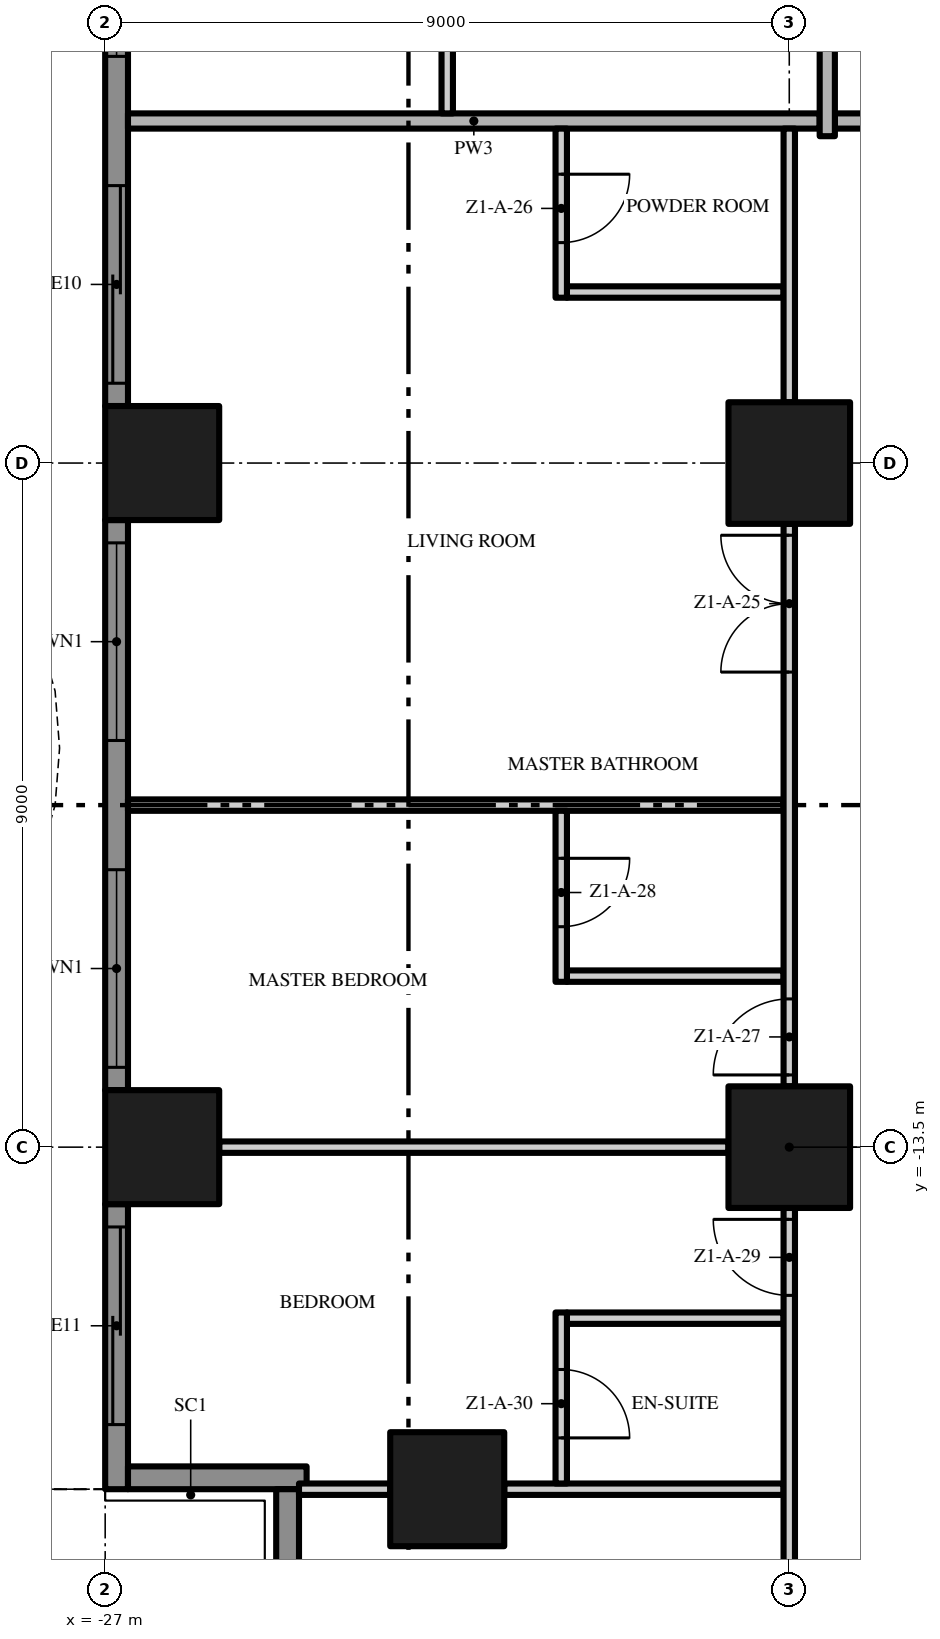
"""IFC4 building model, lengths in metres.
Left out: names, types, materials, properties, quantities, classifications, styles, units other than length and angle.
Written with IfcOpenShell. Run it as: python <this file> out.ifc"""

import sys

from ifc_helpers import new_model, si_unit, direction, frame, frame_2d, origin, origin_2d, place, context, subcontext, project, spatial, polyline, rectangle, outline, extrude, element, fill, save


model = new_model("IFC4")
c1 = context("Model", 3, precision=1e-05, world=origin(), true_north=direction((0.0, 1.0)))
c2 = subcontext(c1, "Body", "Model", "MODEL_VIEW")
j1 = project(units=[si_unit("LENGTHUNIT", "METRE"), si_unit("PLANEANGLEUNIT", "RADIAN")], contexts=[c1])
p1 = place(None, origin())
s1 = spatial("IfcSite", under=j1, at=p1, CompositionType="ELEMENT")
p2 = place(p1, origin())
s2 = spatial("IfcBuilding", under=s1, at=p2, CompositionType="ELEMENT")
p3 = place(p2, frame((0.0, 0.0, 15.0)))
s3 = spatial("IfcBuildingStorey", under=s2, at=p3, CompositionType="ELEMENT", Elevation=15.0)
for number, where, z_axis, x_axis in (
    (1, (-18.0, -13.5, 0.0), (0.0, 0.0, 1.0), (1.0, 0.0, 0.0)),
    (2, (-18.0, -4.5, 0.0), (0.0, 0.0, 1.0), (1.0, 0.0, 0.0)),
):
    element("IfcColumn", number, at=place(p3, frame(where, z_axis=z_axis, x_axis=x_axis)), inside=s3, PredefinedType="COLUMN", context=c2, shape_type="SweptSolid", body=[
        extrude(rectangle(XDim=1.6, YDim=1.6, at=origin_2d()), origin(), (0.0, 0.0, 1.0), 3.5),
    ])
for number, where, z_axis, x_axis in (
    (3, (-26.25, -13.5, 0.0), (0.0, 0.0, 1.0), (1.0, 0.0, 0.0)),
    (4, (-22.5, -18.0, 0.0), (0.0, 0.0, 1.0), (1.0, 0.0, 0.0)),
    (5, (-26.25, -4.5, 0.0), (0.0, 0.0, 1.0), (1.0, 0.0, 0.0)),
):
    element("IfcColumn", number, at=place(p3, frame(where, z_axis=z_axis, x_axis=x_axis)), inside=s3, PredefinedType="COLUMN", context=c2, shape_type="SweptSolid", body=[
        extrude(rectangle(XDim=1.5, YDim=1.5, at=origin_2d()), origin(), (0.0, 0.0, 1.0), 3.5),
    ])
p4 = place(p3, frame((-26.85, -3.75, 0.0), z_axis=(0.0, 0.0, 1.0), x_axis=(0.0, 1.0, 0.0)))
e6 = element("IfcWall", 6, at=p4, inside=s3, PredefinedType="SOLIDWALL", context=c2, shape_type="SweptSolid", body=[
    extrude(rectangle(XDim=7.5, YDim=0.3, at=frame_2d((3.75, 0.0))), origin(), (0.0, 0.0, 1.0), 3.5),
])
p5 = place(p4, frame((4.6, 0.0, 0.45)))
e7 = element("IfcOpeningElement", 7, at=p5, cuts=e6, PredefinedType="OPENING", context=c2, shape_type="SweptSolid", body=[
    extrude(rectangle(XDim=2.6, YDim=2.65, at=frame_2d((1.3, 1.325))), frame((0.0, 0.16, 0.0), z_axis=(0.0, -1.0, 0.0), x_axis=(1.0, 0.0, 0.0)), (0.0, 0.0, 1.0), 0.32),
])
p6 = place(p4, frame((0.3, 0.0, 0.0)))
e8 = element("IfcOpeningElement", 8, at=p6, cuts=e6, PredefinedType="OPENING", context=c2, shape_type="SweptSolid", body=[
    extrude(rectangle(XDim=2.6, YDim=2.4, at=frame_2d((1.3, 1.2))), frame((0.0, 0.16, 0.0), z_axis=(0.0, -1.0, 0.0), x_axis=(1.0, 0.0, 0.0)), (0.0, 0.0, 1.0), 0.32),
])
p7 = place(p3, frame((-26.85, -12.75, 0.0), z_axis=(0.0, 0.0, 1.0), x_axis=(0.0, 1.0, 0.0)))
e9 = element("IfcWall", 9, at=p7, inside=s3, PredefinedType="SOLIDWALL", context=c2, shape_type="SweptSolid", body=[
    extrude(rectangle(XDim=7.5, YDim=0.3, at=frame_2d((3.75, 0.0))), origin(), (0.0, 0.0, 1.0), 3.5),
])
p8 = place(p7, frame((4.6, 0.0, 0.45)))
e10 = element("IfcOpeningElement", 10, at=p8, cuts=e9, PredefinedType="OPENING", context=c2, shape_type="SweptSolid", body=[
    extrude(rectangle(XDim=2.6, YDim=2.65, at=frame_2d((1.3, 1.325))), frame((0.0, 0.16, 0.0), z_axis=(0.0, -1.0, 0.0), x_axis=(1.0, 0.0, 0.0)), (0.0, 0.0, 1.0), 0.32),
])
p9 = place(p7, frame((0.3, 0.0, 0.45)))
e11 = element("IfcOpeningElement", 11, at=p9, cuts=e9, PredefinedType="OPENING", context=c2, shape_type="SweptSolid", body=[
    extrude(rectangle(XDim=2.6, YDim=2.65, at=frame_2d((1.3, 1.325))), frame((0.0, 0.16, 0.0), z_axis=(0.0, -1.0, 0.0), x_axis=(1.0, 0.0, 0.0)), (0.0, 0.0, 1.0), 0.32),
])
p10 = place(p3, frame((-26.85, -18.0, 0.0), z_axis=(0.0, 0.0, 1.0), x_axis=(0.0, 1.0, 0.0)))
e12 = element("IfcWall", 12, at=p10, inside=s3, PredefinedType="SOLIDWALL", context=c2, shape_type="SweptSolid", body=[
    extrude(rectangle(XDim=3.75, YDim=0.3, at=frame_2d((1.875, 0.0))), origin(), (0.0, 0.0, 1.0), 3.5),
])
p11 = place(p10, frame((0.85, 0.0, 0.0)))
e13 = element("IfcOpeningElement", 13, at=p11, cuts=e12, PredefinedType="OPENING", context=c2, shape_type="SweptSolid", body=[
    extrude(rectangle(XDim=2.6, YDim=2.4, at=frame_2d((1.3, 1.2))), frame((0.0, 0.16, 0.0), z_axis=(0.0, -1.0, 0.0), x_axis=(1.0, 0.0, 0.0)), (0.0, 0.0, 1.0), 0.32),
])
p12 = place(p3, frame((-24.35, -17.85, 0.0), z_axis=(0.0, 0.0, 1.0), x_axis=(-1.0, 0.0, 0.0)))
e14 = element("IfcWall", 14, at=p12, inside=s3, PredefinedType="SOLIDWALL", context=c2, shape_type="SweptSolid", body=[
    extrude(rectangle(XDim=2.35, YDim=0.3, at=frame_2d((1.175, 0.0))), origin(), (0.0, 0.0, 1.0), 3.5),
])
p13 = place(p3, frame((-24.6, -20.25, 0.0), z_axis=(0.0, 0.0, 1.0), x_axis=(0.0, 1.0, 0.0)))
e15 = element("IfcWall", 15, at=p13, inside=s3, PredefinedType="SOLIDWALL", context=c2, shape_type="SweptSolid", body=[
    extrude(rectangle(XDim=2.25, YDim=0.3, at=frame_2d((1.125, 0.0))), origin(), (0.0, 0.0, 1.0), 3.5),
])
p14 = place(p3, origin())
e16 = element("IfcWall", 16, at=p14, inside=s3, PredefinedType="USERDEFINED", context=c2, shape_type="SweptSolid", body=[
    extrude(outline(polyline([(-28.8, 18.0), (-29.505, 16.5), (-29.941, 15.0), (-30.0, 14.25), (-29.941, 13.5), (-29.505, 12.0), (-28.8, 10.5), (-28.095, 9.0), (-27.659, 7.5), (-27.6, 6.75), (-27.659, 6.0), (-28.095, 4.5), (-28.8, 3.0), (-29.505, 1.5), (-29.941, 0.0), (-30.0, -0.75), (-29.941, -1.5), (-29.505, -3.0), (-28.8, -4.5), (-28.095, -6.0), (-27.659, -7.5), (-27.6, -8.25), (-27.659, -9.0), (-28.095, -10.5), (-28.8, -12.0), (-29.505, -13.5), (-29.941, -15.0), (-30.0, -15.75), (-29.941, -16.5), (-29.505, -18.0), (-29.265, -17.93), (-29.694, -16.455), (-29.749, -15.75), (-29.694, -15.045), (-29.271, -13.589), (-28.574, -12.106), (-27.86, -10.589), (-27.411, -9.045), (-27.349, -8.25), (-27.411, -7.455), (-27.86, -5.911), (-28.574, -4.394), (-29.271, -2.911), (-29.694, -1.455), (-29.749, -0.75), (-29.694, -0.045), (-29.271, 1.411), (-28.574, 2.894), (-27.86, 4.411), (-27.411, 5.955), (-27.349, 6.75), (-27.411, 7.545), (-27.86, 9.089), (-28.574, 10.606), (-29.271, 12.089), (-29.694, 13.545), (-29.749, 14.25), (-29.694, 14.955), (-29.271, 16.411), (-28.574, 17.894), (-28.8, 18.0)])), origin(), (0.0, 0.0, 1.0), 0.9),
])
p15 = place(p3, frame((-24.45, -18.0, 0.0), z_axis=(0.0, 0.0, 1.0), x_axis=(1.0, 0.0, 0.0)))
e17 = element("IfcWall", 17, at=p15, inside=s3, PredefinedType="PARTITIONING", context=c2, shape_type="SweptSolid", body=[
    extrude(rectangle(XDim=1.2, YDim=0.15, at=frame_2d((0.6, 0.0))), origin(), (0.0, 0.0, 1.0), 3.5),
])
p16 = place(p3, frame((-21.75, -18.0, 0.0), z_axis=(0.0, 0.0, 1.0), x_axis=(1.0, 0.0, 0.0)))
e18 = element("IfcWall", 18, at=p16, inside=s3, PredefinedType="PARTITIONING", context=c2, shape_type="SweptSolid", body=[
    extrude(rectangle(XDim=3.675, YDim=0.15, at=frame_2d((1.837, 0.0))), origin(), (0.0, 0.0, 1.0), 3.5),
])
p17 = place(p3, frame((-20.925, -15.75, 0.0), z_axis=(0.0, 0.0, 1.0), x_axis=(1.0, 0.0, 0.0)))
e19 = element("IfcWall", 19, at=p17, inside=s3, PredefinedType="PARTITIONING", context=c2, shape_type="SweptSolid", body=[
    extrude(rectangle(XDim=2.85, YDim=0.15, at=frame_2d((1.425, 0.0))), origin(), (0.0, 0.0, 1.0), 3.5),
])
p18 = place(p3, frame((-25.5, -13.5, 0.0), z_axis=(0.0, 0.0, 1.0), x_axis=(1.0, 0.0, 0.0)))
e20 = element("IfcWall", 20, at=p18, inside=s3, PredefinedType="PARTITIONING", context=c2, shape_type="SweptSolid", body=[
    extrude(rectangle(XDim=6.7, YDim=0.15, at=frame_2d((3.35, 0.0))), origin(), (0.0, 0.0, 1.0), 3.5),
])
p19 = place(p3, frame((-20.925, -11.25, 0.0), z_axis=(0.0, 0.0, 1.0), x_axis=(1.0, 0.0, 0.0)))
e21 = element("IfcWall", 21, at=p19, inside=s3, PredefinedType="PARTITIONING", context=c2, shape_type="SweptSolid", body=[
    extrude(rectangle(XDim=2.85, YDim=0.15, at=frame_2d((1.425, 0.0))), origin(), (0.0, 0.0, 1.0), 3.5),
])
p20 = place(p3, frame((-26.7, -9.0, 0.0), z_axis=(0.0, 0.0, 1.0), x_axis=(1.0, 0.0, 0.0)))
e22 = element("IfcWall", 22, at=p20, inside=s3, PredefinedType="PARTITIONING", context=c2, shape_type="SweptSolid", body=[
    extrude(rectangle(XDim=8.625, YDim=0.15, at=frame_2d((4.312, 0.0))), origin(), (0.0, 0.0, 1.0), 3.5),
])
p21 = place(p3, frame((-20.925, -2.25, 0.0), z_axis=(0.0, 0.0, 1.0), x_axis=(1.0, 0.0, 0.0)))
e23 = element("IfcWall", 23, at=p21, inside=s3, PredefinedType="PARTITIONING", context=c2, shape_type="SweptSolid", body=[
    extrude(rectangle(XDim=2.85, YDim=0.15, at=frame_2d((1.425, 0.0))), origin(), (0.0, 0.0, 1.0), 3.5),
])
p22 = place(p3, frame((-17.4, 0.0, 0.0), z_axis=(0.0, 0.0, 1.0), x_axis=(1.0, 0.0, 0.0)))
e24 = element("IfcWall", 24, at=p22, inside=s3, PredefinedType="PARTITIONING", context=c2, shape_type="SweptSolid", body=[
    extrude(rectangle(XDim=12.8, YDim=0.2, at=frame_2d((6.4, 0.0))), origin(), (0.0, 0.0, 1.0), 3.5),
])
p23 = place(p3, frame((-26.7, 0.0, 0.0), z_axis=(0.0, 0.0, 1.0), x_axis=(1.0, 0.0, 0.0)))
e25 = element("IfcWall", 25, at=p23, inside=s3, PredefinedType="PARTITIONING", context=c2, shape_type="SweptSolid", body=[
    extrude(rectangle(XDim=9.1, YDim=0.2, at=frame_2d((4.55, 0.0))), origin(), (0.0, 0.0, 1.0), 3.5),
])
p24 = place(p3, frame((-22.5, 0.1, 0.0), z_axis=(0.0, 0.0, 1.0), x_axis=(0.0, 1.0, 0.0)))
e26 = element("IfcWall", 26, at=p24, inside=s3, PredefinedType="PARTITIONING", context=c2, shape_type="SweptSolid", body=[
    extrude(rectangle(XDim=17.15, YDim=0.15, at=frame_2d((8.575, 0.0))), origin(), (0.0, 0.0, 1.0), 3.5),
])
p25 = place(p24, frame((1.65, 0.0, 0.0)))
e27 = element("IfcOpeningElement", 27, at=p25, cuts=e26, PredefinedType="OPENING", context=c2, shape_type="SweptSolid", body=[
    extrude(rectangle(XDim=1.0, YDim=2.4, at=frame_2d((0.5, 1.2))), frame((0.0, 0.085, 0.0), z_axis=(0.0, -1.0, 0.0), x_axis=(1.0, 0.0, 0.0)), (0.0, 0.0, 1.0), 0.17),
])
p26 = place(p24, frame((7.25, 0.0, 0.0)))
e28 = element("IfcOpeningElement", 28, at=p26, cuts=e26, PredefinedType="OPENING", context=c2, shape_type="SweptSolid", body=[
    extrude(rectangle(XDim=1.0, YDim=2.4, at=frame_2d((0.5, 1.2))), frame((0.0, 0.085, 0.0), z_axis=(0.0, -1.0, 0.0), x_axis=(1.0, 0.0, 0.0)), (0.0, 0.0, 1.0), 0.17),
])
p27 = place(p24, frame((9.5, 0.0, 0.0)))
e29 = element("IfcOpeningElement", 29, at=p27, cuts=e26, PredefinedType="OPENING", context=c2, shape_type="SweptSolid", body=[
    extrude(rectangle(XDim=1.0, YDim=2.4, at=frame_2d((0.5, 1.2))), frame((0.0, 0.085, 0.0), z_axis=(0.0, -1.0, 0.0), x_axis=(1.0, 0.0, 0.0)), (0.0, 0.0, 1.0), 0.17),
])
p28 = place(p24, frame((16.0, 0.0, 0.0)))
e30 = element("IfcOpeningElement", 30, at=p28, cuts=e26, PredefinedType="OPENING", context=c2, shape_type="SweptSolid", body=[
    extrude(rectangle(XDim=1.0, YDim=2.4, at=frame_2d((0.5, 1.2))), frame((0.0, 0.085, 0.0), z_axis=(0.0, -1.0, 0.0), x_axis=(1.0, 0.0, 0.0)), (0.0, 0.0, 1.0), 0.17),
])
p29 = place(p3, frame((-21.0, -15.675, 0.0), z_axis=(0.0, 0.0, 1.0), x_axis=(0.0, -1.0, 0.0)))
e31 = element("IfcWall", 31, at=p29, inside=s3, PredefinedType="PARTITIONING", context=c2, shape_type="SweptSolid", body=[
    extrude(rectangle(XDim=2.25, YDim=0.15, at=frame_2d((1.125, 0.0))), origin(), (0.0, 0.0, 1.0), 3.5),
])
p30 = place(p29, frame((0.75, 0.0, 0.0)))
e32 = element("IfcOpeningElement", 32, at=p30, cuts=e31, PredefinedType="OPENING", context=c2, shape_type="SweptSolid", body=[
    extrude(rectangle(XDim=0.9, YDim=2.1, at=frame_2d((0.45, 1.05))), frame((0.0, 0.085, 0.0), z_axis=(0.0, -1.0, 0.0), x_axis=(1.0, 0.0, 0.0)), (0.0, 0.0, 1.0), 0.17),
])
p31 = place(p3, frame((-21.0, -9.075, 0.0), z_axis=(0.0, 0.0, 1.0), x_axis=(0.0, -1.0, 0.0)))
e33 = element("IfcWall", 33, at=p31, inside=s3, PredefinedType="PARTITIONING", context=c2, shape_type="SweptSolid", body=[
    extrude(rectangle(XDim=2.25, YDim=0.15, at=frame_2d((1.125, 0.0))), origin(), (0.0, 0.0, 1.0), 3.5),
])
p32 = place(p31, frame((0.625, 0.0, 0.0)))
e34 = element("IfcOpeningElement", 34, at=p32, cuts=e33, PredefinedType="OPENING", context=c2, shape_type="SweptSolid", body=[
    extrude(rectangle(XDim=0.9, YDim=2.1, at=frame_2d((0.45, 1.05))), frame((0.0, 0.085, 0.0), z_axis=(0.0, -1.0, 0.0), x_axis=(1.0, 0.0, 0.0)), (0.0, 0.0, 1.0), 0.17),
])
p33 = place(p3, frame((-21.0, -0.1, 0.0), z_axis=(0.0, 0.0, 1.0), x_axis=(0.0, -1.0, 0.0)))
e35 = element("IfcWall", 35, at=p33, inside=s3, PredefinedType="PARTITIONING", context=c2, shape_type="SweptSolid", body=[
    extrude(rectangle(XDim=2.225, YDim=0.15, at=frame_2d((1.113, 0.0))), origin(), (0.0, 0.0, 1.0), 3.5),
])
p34 = place(p33, frame((0.6, 0.0, 0.0)))
e36 = element("IfcOpeningElement", 36, at=p34, cuts=e35, PredefinedType="OPENING", context=c2, shape_type="SweptSolid", body=[
    extrude(rectangle(XDim=0.9, YDim=2.1, at=frame_2d((0.45, 1.05))), frame((0.0, 0.085, 0.0), z_axis=(0.0, -1.0, 0.0), x_axis=(1.0, 0.0, 0.0)), (0.0, 0.0, 1.0), 0.17),
])
p35 = place(p3, frame((-18.0, -21.0, 0.0), z_axis=(0.0, 0.0, 1.0), x_axis=(0.0, 1.0, 0.0)))
e37 = element("IfcWall", 37, at=p35, inside=s3, PredefinedType="PARTITIONING", context=c2, shape_type="SweptSolid", body=[
    extrude(rectangle(XDim=6.7, YDim=0.15, at=frame_2d((3.35, 0.0))), origin(), (0.0, 0.0, 1.0), 3.5),
])
p36 = place(p35, frame((5.55, 0.0, 0.0)))
e38 = element("IfcOpeningElement", 38, at=p36, cuts=e37, PredefinedType="OPENING", context=c2, shape_type="SweptSolid", body=[
    extrude(rectangle(XDim=1.0, YDim=2.4, at=frame_2d((0.5, 1.2))), frame((0.0, 0.085, 0.0), z_axis=(0.0, -1.0, 0.0), x_axis=(1.0, 0.0, 0.0)), (0.0, 0.0, 1.0), 0.17),
])
p37 = place(p35, frame((0.25, 0.0, 0.0)))
e39 = element("IfcOpeningElement", 39, at=p37, cuts=e37, PredefinedType="OPENING", context=c2, shape_type="SweptSolid", body=[
    extrude(rectangle(XDim=1.0, YDim=2.4, at=frame_2d((0.5, 1.2))), frame((0.0, 0.085, 0.0), z_axis=(0.0, -1.0, 0.0), x_axis=(1.0, 0.0, 0.0)), (0.0, 0.0, 1.0), 0.17),
])
p38 = place(p3, frame((-18.0, -12.7, 0.0), z_axis=(0.0, 0.0, 1.0), x_axis=(0.0, 1.0, 0.0)))
e40 = element("IfcWall", 40, at=p38, inside=s3, PredefinedType="PARTITIONING", context=c2, shape_type="SweptSolid", body=[
    extrude(rectangle(XDim=7.4, YDim=0.15, at=frame_2d((3.7, 0.0))), origin(), (0.0, 0.0, 1.0), 3.5),
])
p39 = place(p38, frame((5.45, 0.0, 0.0)))
e41 = element("IfcOpeningElement", 41, at=p39, cuts=e40, PredefinedType="OPENING", context=c2, shape_type="SweptSolid", body=[
    extrude(rectangle(XDim=1.8, YDim=2.4, at=frame_2d((0.9, 1.2))), frame((0.0, 0.085, 0.0), z_axis=(0.0, -1.0, 0.0), x_axis=(1.0, 0.0, 0.0)), (0.0, 0.0, 1.0), 0.17),
])
p40 = place(p38, frame((0.15, 0.0, 0.0)))
e42 = element("IfcOpeningElement", 42, at=p40, cuts=e40, PredefinedType="OPENING", context=c2, shape_type="SweptSolid", body=[
    extrude(rectangle(XDim=1.0, YDim=2.4, at=frame_2d((0.5, 1.2))), frame((0.0, 0.085, 0.0), z_axis=(0.0, -1.0, 0.0), x_axis=(1.0, 0.0, 0.0)), (0.0, 0.0, 1.0), 0.17),
])
p41 = place(p3, frame((-18.0, -3.7, 0.0), z_axis=(0.0, 0.0, 1.0), x_axis=(0.0, 1.0, 0.0)))
e43 = element("IfcWall", 43, at=p41, inside=s3, PredefinedType="PARTITIONING", context=c2, shape_type="SweptSolid", body=[
    extrude(rectangle(XDim=3.6, YDim=0.15, at=frame_2d((1.8, 0.0))), origin(), (0.0, 0.0, 1.0), 3.5),
])
p42 = place(p3, frame((-17.5, -0.2, 0.0), z_axis=(0.0, 0.0, 1.0), x_axis=(0.0, 1.0, 0.0)))
e44 = element("IfcWall", 44, at=p42, inside=s3, PredefinedType="PARTITIONING", context=c2, shape_type="SweptSolid", body=[
    extrude(rectangle(XDim=3.9, YDim=0.2, at=frame_2d((1.95, 0.0))), origin(), (0.0, 0.0, 1.0), 3.5),
])
p43 = place(p5, origin())
e45 = element("IfcWindow", 45, at=p43, inside=s3, PartitioningType="SINGLE_PANEL", PredefinedType="WINDOW", context=c2, shape_type="SweptSolid", body=[
    extrude(rectangle(XDim=2.6, YDim=2.65, at=frame_2d((1.3, 1.325))), frame((0.0, 0.03, 0.0), z_axis=(0.0, -1.0, 0.0), x_axis=(1.0, 0.0, 0.0)), (0.0, 0.0, 1.0), 0.06),
])
fill(e7, e45)
p44 = place(p6, origin())
e46 = element("IfcDoor", 46, at=p44, inside=s3, OperationType="SINGLE_SWING_LEFT", PredefinedType="DOOR", context=c2, shape_type="SweptSolid", body=[
    extrude(rectangle(XDim=2.6, YDim=2.4, at=frame_2d((1.3, 1.2))), frame((0.0, 0.025, 0.0), z_axis=(0.0, -1.0, 0.0), x_axis=(1.0, 0.0, 0.0)), (0.0, 0.0, 1.0), 0.05),
])
fill(e8, e46)
p45 = place(p8, origin())
e47 = element("IfcWindow", 47, at=p45, inside=s3, PartitioningType="SINGLE_PANEL", PredefinedType="WINDOW", context=c2, shape_type="SweptSolid", body=[
    extrude(rectangle(XDim=2.6, YDim=2.65, at=frame_2d((1.3, 1.325))), frame((0.0, 0.03, 0.0), z_axis=(0.0, -1.0, 0.0), x_axis=(1.0, 0.0, 0.0)), (0.0, 0.0, 1.0), 0.06),
])
fill(e10, e47)
p46 = place(p9, origin())
e48 = element("IfcWindow", 48, at=p46, inside=s3, PartitioningType="SINGLE_PANEL", PredefinedType="WINDOW", context=c2, shape_type="SweptSolid", body=[
    extrude(rectangle(XDim=2.6, YDim=2.65, at=frame_2d((1.3, 1.325))), frame((0.0, 0.03, 0.0), z_axis=(0.0, -1.0, 0.0), x_axis=(1.0, 0.0, 0.0)), (0.0, 0.0, 1.0), 0.06),
])
fill(e11, e48)
p47 = place(p11, origin())
e49 = element("IfcDoor", 49, at=p47, inside=s3, OperationType="SINGLE_SWING_LEFT", PredefinedType="DOOR", context=c2, shape_type="SweptSolid", body=[
    extrude(rectangle(XDim=2.6, YDim=2.4, at=frame_2d((1.3, 1.2))), frame((0.0, 0.025, 0.0), z_axis=(0.0, -1.0, 0.0), x_axis=(1.0, 0.0, 0.0)), (0.0, 0.0, 1.0), 0.05),
])
fill(e13, e49)
p48 = place(p39, origin())
e50 = element("IfcDoor", 50, at=p48, inside=s3, OperationType="DOUBLE_DOOR_SINGLE_SWING", PredefinedType="DOOR", context=c2, shape_type="SweptSolid", body=[
    extrude(rectangle(XDim=1.8, YDim=2.4, at=frame_2d((0.9, 1.2))), frame((0.0, 0.025, 0.0), z_axis=(0.0, -1.0, 0.0), x_axis=(1.0, 0.0, 0.0)), (0.0, 0.0, 1.0), 0.05),
])
fill(e41, e50)
p49 = place(p34, origin())
e51 = element("IfcDoor", 51, at=p49, inside=s3, OperationType="SINGLE_SWING_LEFT", PredefinedType="DOOR", context=c2, shape_type="SweptSolid", body=[
    extrude(rectangle(XDim=0.9, YDim=2.1, at=frame_2d((0.45, 1.05))), frame((0.0, 0.025, 0.0), z_axis=(0.0, -1.0, 0.0), x_axis=(1.0, 0.0, 0.0)), (0.0, 0.0, 1.0), 0.05),
])
fill(e36, e51)
p50 = place(p40, origin())
e52 = element("IfcDoor", 52, at=p50, inside=s3, OperationType="SINGLE_SWING_LEFT", PredefinedType="DOOR", context=c2, shape_type="SweptSolid", body=[
    extrude(rectangle(XDim=1.0, YDim=2.4, at=frame_2d((0.5, 1.2))), frame((0.0, 0.025, 0.0), z_axis=(0.0, -1.0, 0.0), x_axis=(1.0, 0.0, 0.0)), (0.0, 0.0, 1.0), 0.05),
])
fill(e42, e52)
p51 = place(p32, origin())
e53 = element("IfcDoor", 53, at=p51, inside=s3, OperationType="SINGLE_SWING_LEFT", PredefinedType="DOOR", context=c2, shape_type="SweptSolid", body=[
    extrude(rectangle(XDim=0.9, YDim=2.1, at=frame_2d((0.45, 1.05))), frame((0.0, 0.025, 0.0), z_axis=(0.0, -1.0, 0.0), x_axis=(1.0, 0.0, 0.0)), (0.0, 0.0, 1.0), 0.05),
])
fill(e34, e53)
p52 = place(p36, origin())
e54 = element("IfcDoor", 54, at=p52, inside=s3, OperationType="SINGLE_SWING_RIGHT", PredefinedType="DOOR", context=c2, shape_type="SweptSolid", body=[
    extrude(rectangle(XDim=1.0, YDim=2.4, at=frame_2d((0.5, 1.2))), frame((0.0, 0.025, 0.0), z_axis=(0.0, -1.0, 0.0), x_axis=(1.0, 0.0, 0.0)), (0.0, 0.0, 1.0), 0.05),
])
fill(e38, e54)
p53 = place(p30, origin())
e55 = element("IfcDoor", 55, at=p53, inside=s3, OperationType="SINGLE_SWING_RIGHT", PredefinedType="DOOR", context=c2, shape_type="SweptSolid", body=[
    extrude(rectangle(XDim=0.9, YDim=2.1, at=frame_2d((0.45, 1.05))), frame((0.0, 0.025, 0.0), z_axis=(0.0, -1.0, 0.0), x_axis=(1.0, 0.0, 0.0)), (0.0, 0.0, 1.0), 0.05),
])
fill(e32, e55)
save(model, sys.argv[1])
